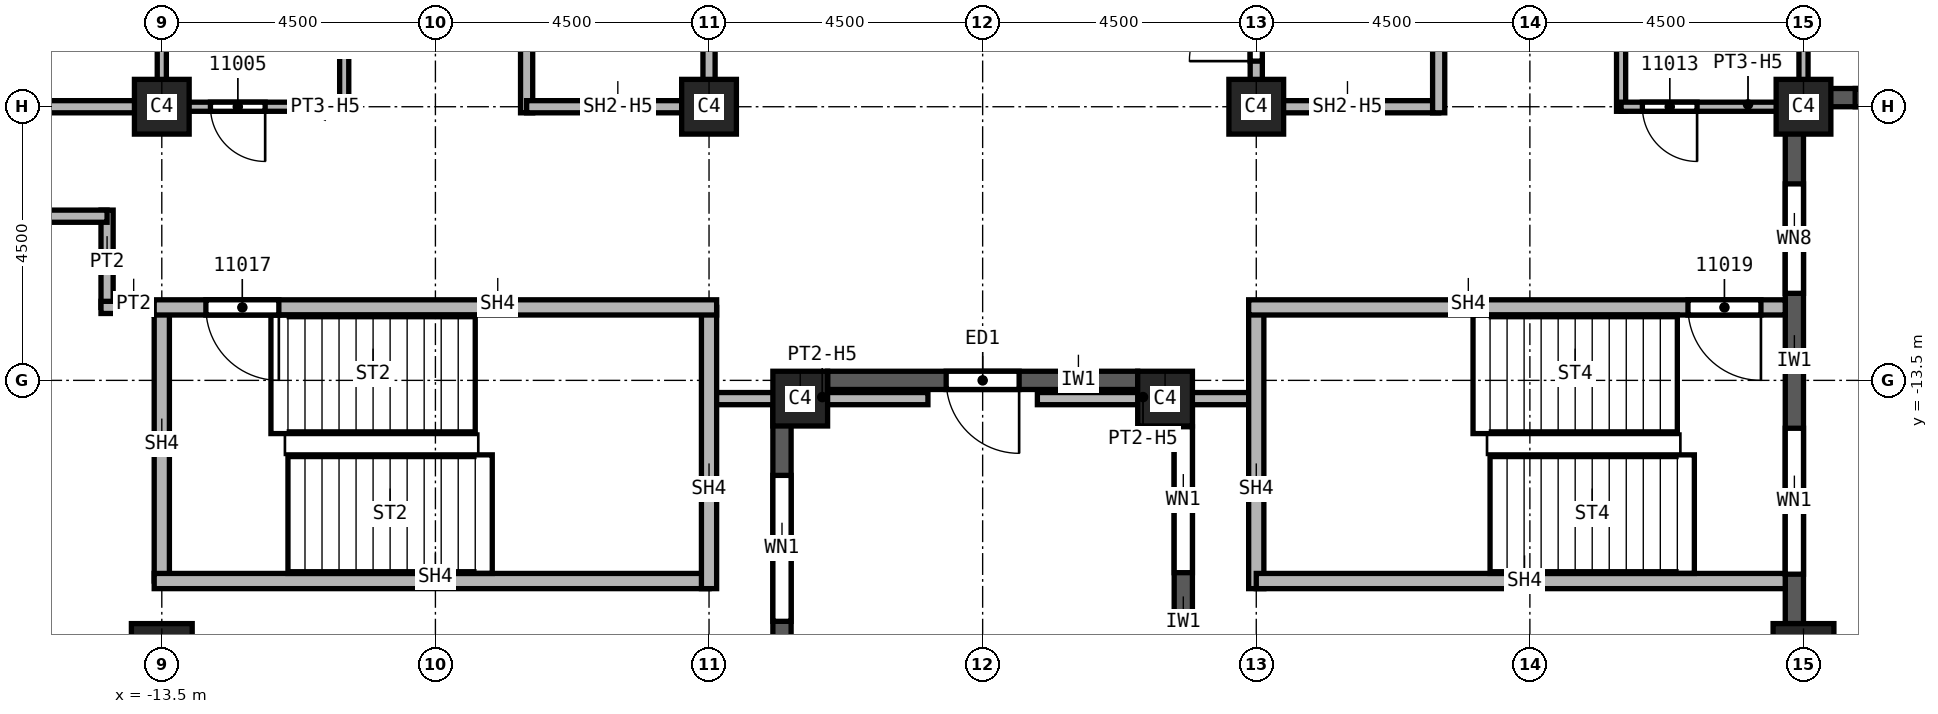
"""IFC4 building model, lengths in metres.
Left out: names, types, materials, properties, quantities, classifications, styles, units other than length and angle.
Written with IfcOpenShell. Run it as: python <this file> out.ifc"""

import sys

from ifc_helpers import new_model, si_unit, direction, frame, frame_2d, origin, origin_2d, place, context, subcontext, project, spatial, rectangle, extrude, element, fill, save


model = new_model("IFC4")
c1 = context("Model", 3, precision=1e-05, world=origin(), true_north=direction((0.0, 1.0)))
c2 = subcontext(c1, "Body", "Model", "MODEL_VIEW")
j1 = project(units=[si_unit("LENGTHUNIT", "METRE"), si_unit("PLANEANGLEUNIT", "RADIAN")], contexts=[c1])
p1 = place(None, origin())
s1 = spatial("IfcSite", under=j1, at=p1, CompositionType="ELEMENT")
p2 = place(p1, origin())
s2 = spatial("IfcBuilding", under=s1, at=p2, CompositionType="ELEMENT")
p3 = place(p2, frame((0.0, 0.0, 184.0)))
s3 = spatial("IfcBuildingStorey", under=s2, at=p3, CompositionType="ELEMENT", Elevation=184.0)
for number, where, z_axis, x_axis in (
    (1, (13.5, -18.0, 0.0), (0.0, 0.0, 1.0), (1.0, 0.0, 0.0)),
    (2, (-13.5, -18.0, 0.0), (0.0, 0.0, 1.0), (1.0, 0.0, 0.0)),
):
    element("IfcColumn", number, at=place(p3, frame(where, z_axis=z_axis, x_axis=x_axis)), inside=s3, PredefinedType="COLUMN", context=c2, shape_type="SweptSolid", body=[
        extrude(rectangle(XDim=1.0, YDim=1.0, at=origin_2d()), origin(), (0.0, 0.0, 1.0), 3.72),
    ])
for number, where, z_axis, x_axis in (
    (3, (4.5, -9.0, 0.0), (0.0, 0.0, 1.0), (1.0, 0.0, 0.0)),
    (4, (13.5, -9.0, 0.0), (0.0, 0.0, 1.0), (1.0, 0.0, 0.0)),
    (5, (-4.5, -9.0, 0.0), (0.0, 0.0, 1.0), (1.0, 0.0, 0.0)),
    (6, (-13.5, -9.0, 0.0), (0.0, 0.0, 1.0), (1.0, 0.0, 0.0)),
    (7, (3.0, -13.8, 0.0), (0.0, 0.0, 1.0), (1.0, 0.0, 0.0)),
    (8, (-3.0, -13.8, 0.0), (0.0, 0.0, 1.0), (1.0, 0.0, 0.0)),
):
    element("IfcColumn", number, at=place(p3, frame(where, z_axis=z_axis, x_axis=x_axis)), inside=s3, PredefinedType="COLUMN", context=c2, shape_type="SweptSolid", body=[
        extrude(rectangle(XDim=0.9, YDim=0.9, at=origin_2d()), origin(), (0.0, 0.0, 1.0), 3.72),
    ])
p4 = place(p3, frame((-3.3, -22.3, 0.0), z_axis=(0.0, 0.0, 1.0), x_axis=(0.0, 1.0, 0.0)))
e9 = element("IfcWall", 9, at=p4, inside=s3, PredefinedType="SOLIDWALL", context=c2, shape_type="SweptSolid", body=[
    extrude(rectangle(XDim=8.45, YDim=0.3, at=frame_2d((4.225, 0.0))), origin(), (0.0, 0.0, 1.0), 3.12),
])
p5 = place(p4, frame((0.812, 0.0, 0.8)))
e10 = element("IfcOpeningElement", 10, at=p5, cuts=e9, PredefinedType="OPENING", context=c2, shape_type="SweptSolid", body=[
    extrude(rectangle(XDim=2.4, YDim=1.95, at=frame_2d((1.2, 0.975))), frame((0.0, 0.15, 0.0), z_axis=(0.0, -1.0, 0.0), x_axis=(1.0, 0.0, 0.0)), (0.0, 0.0, 1.0), 0.3),
])
p6 = place(p4, frame((4.837, 0.0, 0.8)))
e11 = element("IfcOpeningElement", 11, at=p6, cuts=e9, PredefinedType="OPENING", context=c2, shape_type="SweptSolid", body=[
    extrude(rectangle(XDim=2.4, YDim=1.95, at=frame_2d((1.2, 0.975))), frame((0.0, 0.15, 0.0), z_axis=(0.0, -1.0, 0.0), x_axis=(1.0, 0.0, 0.0)), (0.0, 0.0, 1.0), 0.3),
])
p7 = place(p3, frame((2.55, -13.5, 0.0), z_axis=(0.0, 0.0, 1.0), x_axis=(-1.0, 0.0, 0.0)))
e12 = element("IfcWall", 12, at=p7, inside=s3, PredefinedType="SOLIDWALL", context=c2, shape_type="SweptSolid", body=[
    extrude(rectangle(XDim=5.1, YDim=0.3, at=frame_2d((2.55, 0.0))), origin(), (0.0, 0.0, 1.0), 3.12),
])
p8 = place(p7, frame((1.95, 0.0, 0.0)))
e13 = element("IfcOpeningElement", 13, at=p8, cuts=e12, PredefinedType="OPENING", context=c2, shape_type="SweptSolid", body=[
    extrude(rectangle(XDim=1.2, YDim=2.4, at=frame_2d((0.6, 1.2))), frame((0.0, 0.15, 0.0), z_axis=(0.0, -1.0, 0.0), x_axis=(1.0, 0.0, 0.0)), (0.0, 0.0, 1.0), 0.3),
])
p9 = place(p3, frame((3.3, -13.85, 0.0), z_axis=(0.0, 0.0, 1.0), x_axis=(0.0, -1.0, 0.0)))
e14 = element("IfcWall", 14, at=p9, inside=s3, PredefinedType="SOLIDWALL", context=c2, shape_type="SweptSolid", body=[
    extrude(rectangle(XDim=8.45, YDim=0.3, at=frame_2d((4.225, 0.0))), origin(), (0.0, 0.0, 1.0), 3.12),
])
p10 = place(p9, frame((0.413, 0.0, 0.8)))
e15 = element("IfcOpeningElement", 15, at=p10, cuts=e14, PredefinedType="OPENING", context=c2, shape_type="SweptSolid", body=[
    extrude(rectangle(XDim=2.4, YDim=1.95, at=frame_2d((1.2, 0.975))), frame((0.0, 0.15, 0.0), z_axis=(0.0, -1.0, 0.0), x_axis=(1.0, 0.0, 0.0)), (0.0, 0.0, 1.0), 0.3),
])
p11 = place(p9, frame((4.438, 0.0, 0.8)))
e16 = element("IfcOpeningElement", 16, at=p11, cuts=e14, PredefinedType="OPENING", context=c2, shape_type="SweptSolid", body=[
    extrude(rectangle(XDim=2.4, YDim=1.95, at=frame_2d((1.2, 0.975))), frame((0.0, 0.15, 0.0), z_axis=(0.0, -1.0, 0.0), x_axis=(1.0, 0.0, 0.0)), (0.0, 0.0, 1.0), 0.3),
])
p12 = place(p3, frame((13.35, -17.5, 0.0), z_axis=(0.0, 0.0, 1.0), x_axis=(0.0, 1.0, 0.0)))
e17 = element("IfcWall", 17, at=p12, inside=s3, PredefinedType="SOLIDWALL", context=c2, shape_type="SweptSolid", body=[
    extrude(rectangle(XDim=8.475, YDim=0.3, at=frame_2d((4.238, 0.0))), origin(), (0.0, 0.0, 1.0), 3.12),
])
p13 = place(p12, frame((0.812, 0.0, 0.8)))
e18 = element("IfcOpeningElement", 18, at=p13, cuts=e17, PredefinedType="OPENING", context=c2, shape_type="SweptSolid", body=[
    extrude(rectangle(XDim=2.4, YDim=1.95, at=frame_2d((1.2, 0.975))), frame((0.0, 0.15, 0.0), z_axis=(0.0, -1.0, 0.0), x_axis=(1.0, 0.0, 0.0)), (0.0, 0.0, 1.0), 0.3),
])
p14 = place(p12, frame((5.431, 0.0, 0.8)))
e19 = element("IfcOpeningElement", 19, at=p14, cuts=e17, PredefinedType="OPENING", context=c2, shape_type="SweptSolid", body=[
    extrude(rectangle(XDim=1.8, YDim=1.95, at=frame_2d((0.9, 0.975))), frame((0.0, 0.15, 0.0), z_axis=(0.0, -1.0, 0.0), x_axis=(1.0, 0.0, 0.0)), (0.0, 0.0, 1.0), 0.3),
])
p15 = place(p3, frame((13.525, -8.85, 0.0), z_axis=(0.0, 0.0, 1.0), x_axis=(1.0, 0.0, 0.0)))
e20 = element("IfcWall", 20, at=p15, inside=s3, PredefinedType="SOLIDWALL", context=c2, shape_type="SweptSolid", body=[
    extrude(rectangle(XDim=8.475, YDim=0.3, at=frame_2d((4.238, 0.0))), origin(), (0.0, 0.0, 1.0), 3.12),
])
p16 = place(p15, frame((0.825, 0.0, 0.8)))
e21 = element("IfcOpeningElement", 21, at=p16, cuts=e20, PredefinedType="OPENING", context=c2, shape_type="SweptSolid", body=[
    extrude(rectangle(XDim=1.8, YDim=1.95, at=frame_2d((0.9, 0.975))), frame((0.0, 0.15, 0.0), z_axis=(0.0, -1.0, 0.0), x_axis=(1.0, 0.0, 0.0)), (0.0, 0.0, 1.0), 0.3),
])
p17 = place(p15, frame((4.725, 0.0, 0.8)))
e22 = element("IfcOpeningElement", 22, at=p17, cuts=e20, PredefinedType="OPENING", context=c2, shape_type="SweptSolid", body=[
    extrude(rectangle(XDim=1.4, YDim=1.95, at=frame_2d((0.7, 0.975))), frame((0.0, 0.15, 0.0), z_axis=(0.0, -1.0, 0.0), x_axis=(1.0, 0.0, 0.0)), (0.0, 0.0, 1.0), 0.3),
])
p18 = place(p3, frame((-18.0, -9.0, 0.0), z_axis=(0.0, 0.0, 1.0), x_axis=(1.0, 0.0, 0.0)))
e23 = element("IfcWall", 23, at=p18, inside=s3, PredefinedType="PARTITIONING", context=c2, shape_type="SweptSolid", body=[
    extrude(rectangle(XDim=4.5, YDim=0.2, at=frame_2d((2.25, 0.0))), origin(), (0.0, 0.0, 1.0), 3.72),
])
p19 = place(p3, frame((-14.4, -12.3, 0.0), z_axis=(0.0, 0.0, 1.0), x_axis=(0.0, 1.0, 0.0)))
e24 = element("IfcWall", 24, at=p19, inside=s3, PredefinedType="PARTITIONING", context=c2, shape_type="SweptSolid", body=[
    extrude(rectangle(XDim=1.6, YDim=0.2, at=frame_2d((0.8, 0.0))), origin(), (0.0, 0.0, 1.0), 3.72),
])
p20 = place(p3, frame((-14.4, -10.8, 0.0), z_axis=(0.0, 0.0, 1.0), x_axis=(-1.0, 0.0, 0.0)))
e25 = element("IfcWall", 25, at=p20, inside=s3, PredefinedType="PARTITIONING", context=c2, shape_type="SweptSolid", body=[
    extrude(rectangle(XDim=3.6, YDim=0.2, at=frame_2d((1.8, 0.0))), origin(), (0.0, 0.0, 1.0), 3.72),
])
p21 = place(p3, frame((-13.375, -12.3, 0.0), z_axis=(0.0, 0.0, 1.0), x_axis=(-1.0, 0.0, 0.0)))
e26 = element("IfcWall", 26, at=p21, inside=s3, PredefinedType="PARTITIONING", context=c2, shape_type="SweptSolid", body=[
    extrude(rectangle(XDim=1.125, YDim=0.2, at=frame_2d((0.562, 0.0))), origin(), (0.0, 0.0, 1.0), 3.72),
])
for number, where, z_axis, x_axis in (
    (27, (-0.9, -13.8, 0.0), (0.0, 0.0, 1.0), (-1.0, 0.0, 0.0)),
    (28, (4.5, -13.8, 0.0), (0.0, 0.0, 1.0), (-1.0, 0.0, 0.0)),
):
    element("IfcWall", number, at=place(p3, frame(where, z_axis=z_axis, x_axis=x_axis)), inside=s3, PredefinedType="PARTITIONING", context=c2, shape_type="SweptSolid", body=[
        extrude(rectangle(XDim=3.6, YDim=0.2, at=frame_2d((1.8, 0.0))), origin(), (0.0, 0.0, 1.0), 3.113),
    ])
p22 = place(p3, frame((-7.5, -9.1, 0.0), z_axis=(0.0, 0.0, 1.0), x_axis=(0.0, 1.0, 0.0)))
e29 = element("IfcWall", 29, at=p22, inside=s3, PredefinedType="SOLIDWALL", context=c2, shape_type="SweptSolid", body=[
    extrude(rectangle(XDim=6.225, YDim=0.2, at=frame_2d((3.113, 0.0))), origin(), (0.0, 0.0, 1.0), 3.72),
])
p23 = place(p3, frame((-4.5, -9.0, 0.0), z_axis=(0.0, 0.0, 1.0), x_axis=(-1.0, 0.0, 0.0)))
e30 = element("IfcWall", 30, at=p23, inside=s3, PredefinedType="SOLIDWALL", context=c2, shape_type="SweptSolid", body=[
    extrude(rectangle(XDim=3.0, YDim=0.2, at=frame_2d((1.5, 0.0))), origin(), (0.0, 0.0, 1.0), 2.958),
])
p24 = place(p3, frame((-4.5, 0.0, 0.0), z_axis=(0.0, 0.0, 1.0), x_axis=(0.0, -1.0, 0.0)))
e31 = element("IfcWall", 31, at=p24, inside=s3, PredefinedType="SOLIDWALL", context=c2, shape_type="SweptSolid", body=[
    extrude(rectangle(XDim=9.1, YDim=0.2, at=frame_2d((4.55, 0.0))), origin(), (0.0, 0.0, 1.0), 2.958),
])
p25 = place(p24, frame((1.3, 0.0, 0.0)))
e32 = element("IfcOpeningElement", 32, at=p25, cuts=e31, PredefinedType="OPENING", context=c2, shape_type="SweptSolid", body=[
    extrude(rectangle(XDim=1.1, YDim=2.1, at=frame_2d((0.55, 1.05))), frame((0.0, 0.1, 0.0), z_axis=(0.0, -1.0, 0.0), x_axis=(1.0, 0.0, 0.0)), (0.0, 0.0, 1.0), 0.2),
])
p26 = place(p3, frame((4.5, -9.1, 0.0), z_axis=(0.0, 0.0, 1.0), x_axis=(0.0, 1.0, 0.0)))
e33 = element("IfcWall", 33, at=p26, inside=s3, PredefinedType="SOLIDWALL", context=c2, shape_type="SweptSolid", body=[
    extrude(rectangle(XDim=3.1, YDim=0.2, at=frame_2d((1.55, 0.0))), origin(), (0.0, 0.0, 1.0), 2.958),
])
p27 = place(p26, frame((0.85, 0.0, 0.0)))
e34 = element("IfcOpeningElement", 34, at=p27, cuts=e33, PredefinedType="OPENING", context=c2, shape_type="SweptSolid", body=[
    extrude(rectangle(XDim=1.1, YDim=2.1, at=frame_2d((0.55, 1.05))), frame((0.0, 0.1, 0.0), z_axis=(0.0, -1.0, 0.0), x_axis=(1.0, 0.0, 0.0)), (0.0, 0.0, 1.0), 0.2),
])
p28 = place(p3, frame((7.5, -9.0, 0.0), z_axis=(0.0, 0.0, 1.0), x_axis=(-1.0, 0.0, 0.0)))
e35 = element("IfcWall", 35, at=p28, inside=s3, PredefinedType="SOLIDWALL", context=c2, shape_type="SweptSolid", body=[
    extrude(rectangle(XDim=3.0, YDim=0.2, at=frame_2d((1.5, 0.0))), origin(), (0.0, 0.0, 1.0), 2.958),
])
p29 = place(p3, frame((7.5, -6.0, 0.0), z_axis=(0.0, 0.0, 1.0), x_axis=(0.0, -1.0, 0.0)))
e36 = element("IfcWall", 36, at=p29, inside=s3, PredefinedType="SOLIDWALL", context=c2, shape_type="SweptSolid", body=[
    extrude(rectangle(XDim=3.1, YDim=0.2, at=frame_2d((1.55, 0.0))), origin(), (0.0, 0.0, 1.0), 3.72),
])
p30 = place(p3, frame((-13.5, -16.8, 0.0), z_axis=(0.0, 0.0, 1.0), x_axis=(0.0, 1.0, 0.0)))
e37 = element("IfcWall", 37, at=p30, inside=s3, PredefinedType="SOLIDWALL", context=c2, shape_type="SweptSolid", body=[
    extrude(rectangle(XDim=4.5, YDim=0.25, at=frame_2d((2.25, 0.0))), origin(), (0.0, 0.0, 1.0), 3.72),
])
p31 = place(p3, frame((-4.5, -16.8, 0.0), z_axis=(0.0, 0.0, 1.0), x_axis=(-1.0, 0.0, 0.0)))
e38 = element("IfcWall", 38, at=p31, inside=s3, PredefinedType="SOLIDWALL", context=c2, shape_type="SweptSolid", body=[
    extrude(rectangle(XDim=9.125, YDim=0.25, at=frame_2d((4.562, 0.0))), origin(), (0.0, 0.0, 1.0), 3.72),
])
p32 = place(p3, frame((-4.5, -12.3, 0.0), z_axis=(0.0, 0.0, 1.0), x_axis=(0.0, -1.0, 0.0)))
e39 = element("IfcWall", 39, at=p32, inside=s3, PredefinedType="SOLIDWALL", context=c2, shape_type="SweptSolid", body=[
    extrude(rectangle(XDim=4.625, YDim=0.25, at=frame_2d((2.312, 0.0))), origin(), (0.0, 0.0, 1.0), 3.72),
])
p33 = place(p3, frame((-4.375, -12.3, 0.0), z_axis=(0.0, 0.0, 1.0), x_axis=(-1.0, 0.0, 0.0)))
e40 = element("IfcWall", 40, at=p33, inside=s3, PredefinedType="SOLIDWALL", context=c2, shape_type="SweptSolid", body=[
    extrude(rectangle(XDim=9.25, YDim=0.25, at=frame_2d((4.625, 0.0))), origin(), (0.0, 0.0, 1.0), 3.72),
])
p34 = place(p33, frame((7.2, 0.0, 0.0)))
e41 = element("IfcOpeningElement", 41, at=p34, cuts=e40, PredefinedType="OPENING", context=c2, shape_type="SweptSolid", body=[
    extrude(rectangle(XDim=1.2, YDim=2.1, at=frame_2d((0.6, 1.05))), frame((0.0, 0.125, 0.0), z_axis=(0.0, -1.0, 0.0), x_axis=(1.0, 0.0, 0.0)), (0.0, 0.0, 1.0), 0.25),
])
p35 = place(p3, frame((4.5, -16.925, 0.0), z_axis=(0.0, 0.0, 1.0), x_axis=(0.0, 1.0, 0.0)))
e42 = element("IfcWall", 42, at=p35, inside=s3, PredefinedType="SOLIDWALL", context=c2, shape_type="SweptSolid", body=[
    extrude(rectangle(XDim=4.625, YDim=0.25, at=frame_2d((2.312, 0.0))), origin(), (0.0, 0.0, 1.0), 3.72),
])
p36 = place(p3, frame((13.2, -16.8, 0.0), z_axis=(0.0, 0.0, 1.0), x_axis=(-1.0, 0.0, 0.0)))
e43 = element("IfcWall", 43, at=p36, inside=s3, PredefinedType="SOLIDWALL", context=c2, shape_type="SweptSolid", body=[
    extrude(rectangle(XDim=8.7, YDim=0.25, at=frame_2d((4.35, 0.0))), origin(), (0.0, 0.0, 1.0), 3.72),
])
p37 = place(p3, frame((13.2, -12.3, 0.0), z_axis=(0.0, 0.0, 1.0), x_axis=(-1.0, 0.0, 0.0)))
e44 = element("IfcWall", 44, at=p37, inside=s3, PredefinedType="SOLIDWALL", context=c2, shape_type="SweptSolid", body=[
    extrude(rectangle(XDim=8.825, YDim=0.25, at=frame_2d((4.413, 0.0))), origin(), (0.0, 0.0, 1.0), 3.72),
])
p38 = place(p37, frame((0.4, 0.0, 0.0)))
e45 = element("IfcOpeningElement", 45, at=p38, cuts=e44, PredefinedType="OPENING", context=c2, shape_type="SweptSolid", body=[
    extrude(rectangle(XDim=1.2, YDim=2.1, at=frame_2d((0.6, 1.05))), frame((0.0, 0.125, 0.0), z_axis=(0.0, -1.0, 0.0), x_axis=(1.0, 0.0, 0.0)), (0.0, 0.0, 1.0), 0.25),
])
p39 = place(p3, frame((-13.5, -9.1, 0.0), z_axis=(0.0, 0.0, 1.0), x_axis=(0.0, 1.0, 0.0)))
e46 = element("IfcWall", 46, at=p39, inside=s3, PredefinedType="PARTITIONING", context=c2, shape_type="SweptSolid", body=[
    extrude(rectangle(XDim=2.1, YDim=0.15, at=frame_2d((1.05, 0.0))), origin(), (0.0, 0.0, 1.0), 2.958),
])
p40 = place(p3, frame((-10.5, -9.075, 0.0), z_axis=(0.0, 0.0, 1.0), x_axis=(0.0, 1.0, 0.0)))
e47 = element("IfcWall", 47, at=p40, inside=s3, PredefinedType="PARTITIONING", context=c2, shape_type="SweptSolid", body=[
    extrude(rectangle(XDim=2.15, YDim=0.15, at=frame_2d((1.075, 0.0))), origin(), (0.0, 0.0, 1.0), 3.72),
])
p41 = place(p3, frame((-10.5, -9.0, 0.0), z_axis=(0.0, 0.0, 1.0), x_axis=(-1.0, 0.0, 0.0)))
e48 = element("IfcWall", 48, at=p41, inside=s3, PredefinedType="PARTITIONING", context=c2, shape_type="SweptSolid", body=[
    extrude(rectangle(XDim=3.075, YDim=0.15, at=frame_2d((1.538, 0.0))), origin(), (0.0, 0.0, 1.0), 2.958),
])
p42 = place(p41, frame((1.3, 0.0, 0.0)))
e49 = element("IfcOpeningElement", 49, at=p42, cuts=e48, PredefinedType="OPENING", context=c2, shape_type="SweptSolid", body=[
    extrude(rectangle(XDim=0.9, YDim=2.1, at=frame_2d((0.45, 1.05))), frame((0.0, 0.075, 0.0), z_axis=(0.0, -1.0, 0.0), x_axis=(1.0, 0.0, 0.0)), (0.0, 0.0, 1.0), 0.15),
])
p43 = place(p3, frame((10.5, -5.925, 0.0), z_axis=(0.0, 0.0, 1.0), x_axis=(0.0, -1.0, 0.0)))
e50 = element("IfcWall", 50, at=p43, inside=s3, PredefinedType="PARTITIONING", context=c2, shape_type="SweptSolid", body=[
    extrude(rectangle(XDim=3.15, YDim=0.15, at=frame_2d((1.575, 0.0))), origin(), (0.0, 0.0, 1.0), 3.72),
])
p44 = place(p3, frame((13.5, -6.0, 0.0), z_axis=(0.0, 0.0, 1.0), x_axis=(0.0, -1.0, 0.0)))
e51 = element("IfcWall", 51, at=p44, inside=s3, PredefinedType="PARTITIONING", context=c2, shape_type="SweptSolid", body=[
    extrude(rectangle(XDim=3.0, YDim=0.15, at=frame_2d((1.5, 0.0))), origin(), (0.0, 0.0, 1.0), 2.958),
])
p45 = place(p3, frame((13.525, -9.0, 0.0), z_axis=(0.0, 0.0, 1.0), x_axis=(-1.0, 0.0, 0.0)))
e52 = element("IfcWall", 52, at=p45, inside=s3, PredefinedType="PARTITIONING", context=c2, shape_type="SweptSolid", body=[
    extrude(rectangle(XDim=3.025, YDim=0.15, at=frame_2d((1.512, 0.0))), origin(), (0.0, 0.0, 1.0), 2.958),
])
p46 = place(p45, frame((1.775, 0.0, 0.0)))
e53 = element("IfcOpeningElement", 53, at=p46, cuts=e52, PredefinedType="OPENING", context=c2, shape_type="SweptSolid", body=[
    extrude(rectangle(XDim=0.9, YDim=2.1, at=frame_2d((0.45, 1.05))), frame((0.0, 0.075, 0.0), z_axis=(0.0, -1.0, 0.0), x_axis=(1.0, 0.0, 0.0)), (0.0, 0.0, 1.0), 0.15),
])
p47 = place(p6, origin())
e54 = element("IfcWindow", 54, at=p47, inside=s3, PartitioningType="SINGLE_PANEL", PredefinedType="WINDOW", context=c2, shape_type="SweptSolid", body=[
    extrude(rectangle(XDim=2.4, YDim=1.95, at=frame_2d((1.2, 0.975))), frame((0.0, 0.03, 0.0), z_axis=(0.0, -1.0, 0.0), x_axis=(1.0, 0.0, 0.0)), (0.0, 0.0, 1.0), 0.06),
])
fill(e11, e54)
p48 = place(p8, origin())
e55 = element("IfcDoor", 55, at=p48, inside=s3, OperationType="SINGLE_SWING_LEFT", PredefinedType="DOOR", context=c2, shape_type="SweptSolid", body=[
    extrude(rectangle(XDim=1.2, YDim=2.4, at=frame_2d((0.6, 1.2))), frame((0.0, 0.025, 0.0), z_axis=(0.0, -1.0, 0.0), x_axis=(1.0, 0.0, 0.0)), (0.0, 0.0, 1.0), 0.05),
])
fill(e13, e55)
p49 = place(p10, origin())
e56 = element("IfcWindow", 56, at=p49, inside=s3, PartitioningType="SINGLE_PANEL", PredefinedType="WINDOW", context=c2, shape_type="SweptSolid", body=[
    extrude(rectangle(XDim=2.4, YDim=1.95, at=frame_2d((1.2, 0.975))), frame((0.0, 0.03, 0.0), z_axis=(0.0, -1.0, 0.0), x_axis=(1.0, 0.0, 0.0)), (0.0, 0.0, 1.0), 0.06),
])
fill(e15, e56)
p50 = place(p13, origin())
e57 = element("IfcWindow", 57, at=p50, inside=s3, PartitioningType="SINGLE_PANEL", PredefinedType="WINDOW", context=c2, shape_type="SweptSolid", body=[
    extrude(rectangle(XDim=2.4, YDim=1.95, at=frame_2d((1.2, 0.975))), frame((0.0, 0.03, 0.0), z_axis=(0.0, -1.0, 0.0), x_axis=(1.0, 0.0, 0.0)), (0.0, 0.0, 1.0), 0.06),
])
fill(e18, e57)
p51 = place(p42, origin())
e58 = element("IfcDoor", 58, at=p51, inside=s3, OperationType="SINGLE_SWING_RIGHT", PredefinedType="DOOR", context=c2, shape_type="SweptSolid", body=[
    extrude(rectangle(XDim=0.9, YDim=2.1, at=frame_2d((0.45, 1.05))), frame((0.0, 0.025, 0.0), z_axis=(0.0, -1.0, 0.0), x_axis=(1.0, 0.0, 0.0)), (0.0, 0.0, 1.0), 0.05),
])
fill(e49, e58)
p52 = place(p27, origin())
e59 = element("IfcDoor", 59, at=p52, inside=s3, OperationType="SINGLE_SWING_RIGHT", PredefinedType="DOOR", context=c2, shape_type="SweptSolid", body=[
    extrude(rectangle(XDim=1.1, YDim=2.1, at=frame_2d((0.55, 1.05))), frame((0.0, 0.025, 0.0), z_axis=(0.0, -1.0, 0.0), x_axis=(1.0, 0.0, 0.0)), (0.0, 0.0, 1.0), 0.05),
])
fill(e34, e59)
p53 = place(p46, origin())
e60 = element("IfcDoor", 60, at=p53, inside=s3, OperationType="SINGLE_SWING_RIGHT", PredefinedType="DOOR", context=c2, shape_type="SweptSolid", body=[
    extrude(rectangle(XDim=0.9, YDim=2.1, at=frame_2d((0.45, 1.05))), frame((0.0, 0.025, 0.0), z_axis=(0.0, -1.0, 0.0), x_axis=(1.0, 0.0, 0.0)), (0.0, 0.0, 1.0), 0.05),
])
fill(e53, e60)
p54 = place(p34, origin())
e61 = element("IfcDoor", 61, at=p54, inside=s3, OperationType="SINGLE_SWING_RIGHT", PredefinedType="DOOR", context=c2, shape_type="SweptSolid", body=[
    extrude(rectangle(XDim=1.2, YDim=2.1, at=frame_2d((0.6, 1.05))), frame((0.0, 0.025, 0.0), z_axis=(0.0, -1.0, 0.0), x_axis=(1.0, 0.0, 0.0)), (0.0, 0.0, 1.0), 0.05),
])
fill(e41, e61)
p55 = place(p38, origin())
e62 = element("IfcDoor", 62, at=p55, inside=s3, OperationType="SINGLE_SWING_RIGHT", PredefinedType="DOOR", context=c2, shape_type="SweptSolid", body=[
    extrude(rectangle(XDim=1.2, YDim=2.1, at=frame_2d((0.6, 1.05))), frame((0.0, 0.025, 0.0), z_axis=(0.0, -1.0, 0.0), x_axis=(1.0, 0.0, 0.0)), (0.0, 0.0, 1.0), 0.05),
])
fill(e45, e62)
p56 = place(p14, origin())
e63 = element("IfcWindow", 63, at=p56, inside=s3, PartitioningType="SINGLE_PANEL", PredefinedType="WINDOW", context=c2, shape_type="SweptSolid", body=[
    extrude(rectangle(XDim=1.8, YDim=1.95, at=frame_2d((0.9, 0.975))), frame((0.0, 0.03, 0.0), z_axis=(0.0, -1.0, 0.0), x_axis=(1.0, 0.0, 0.0)), (0.0, 0.0, 1.0), 0.06),
])
fill(e19, e63)
p57 = place(p16, origin())
e64 = element("IfcWindow", 64, at=p57, inside=s3, PartitioningType="SINGLE_PANEL", PredefinedType="WINDOW", context=c2, shape_type="SweptSolid", body=[
    extrude(rectangle(XDim=1.8, YDim=1.95, at=frame_2d((0.9, 0.975))), frame((0.0, 0.03, 0.0), z_axis=(0.0, -1.0, 0.0), x_axis=(1.0, 0.0, 0.0)), (0.0, 0.0, 1.0), 0.06),
])
fill(e21, e64)
save(model, sys.argv[1])
